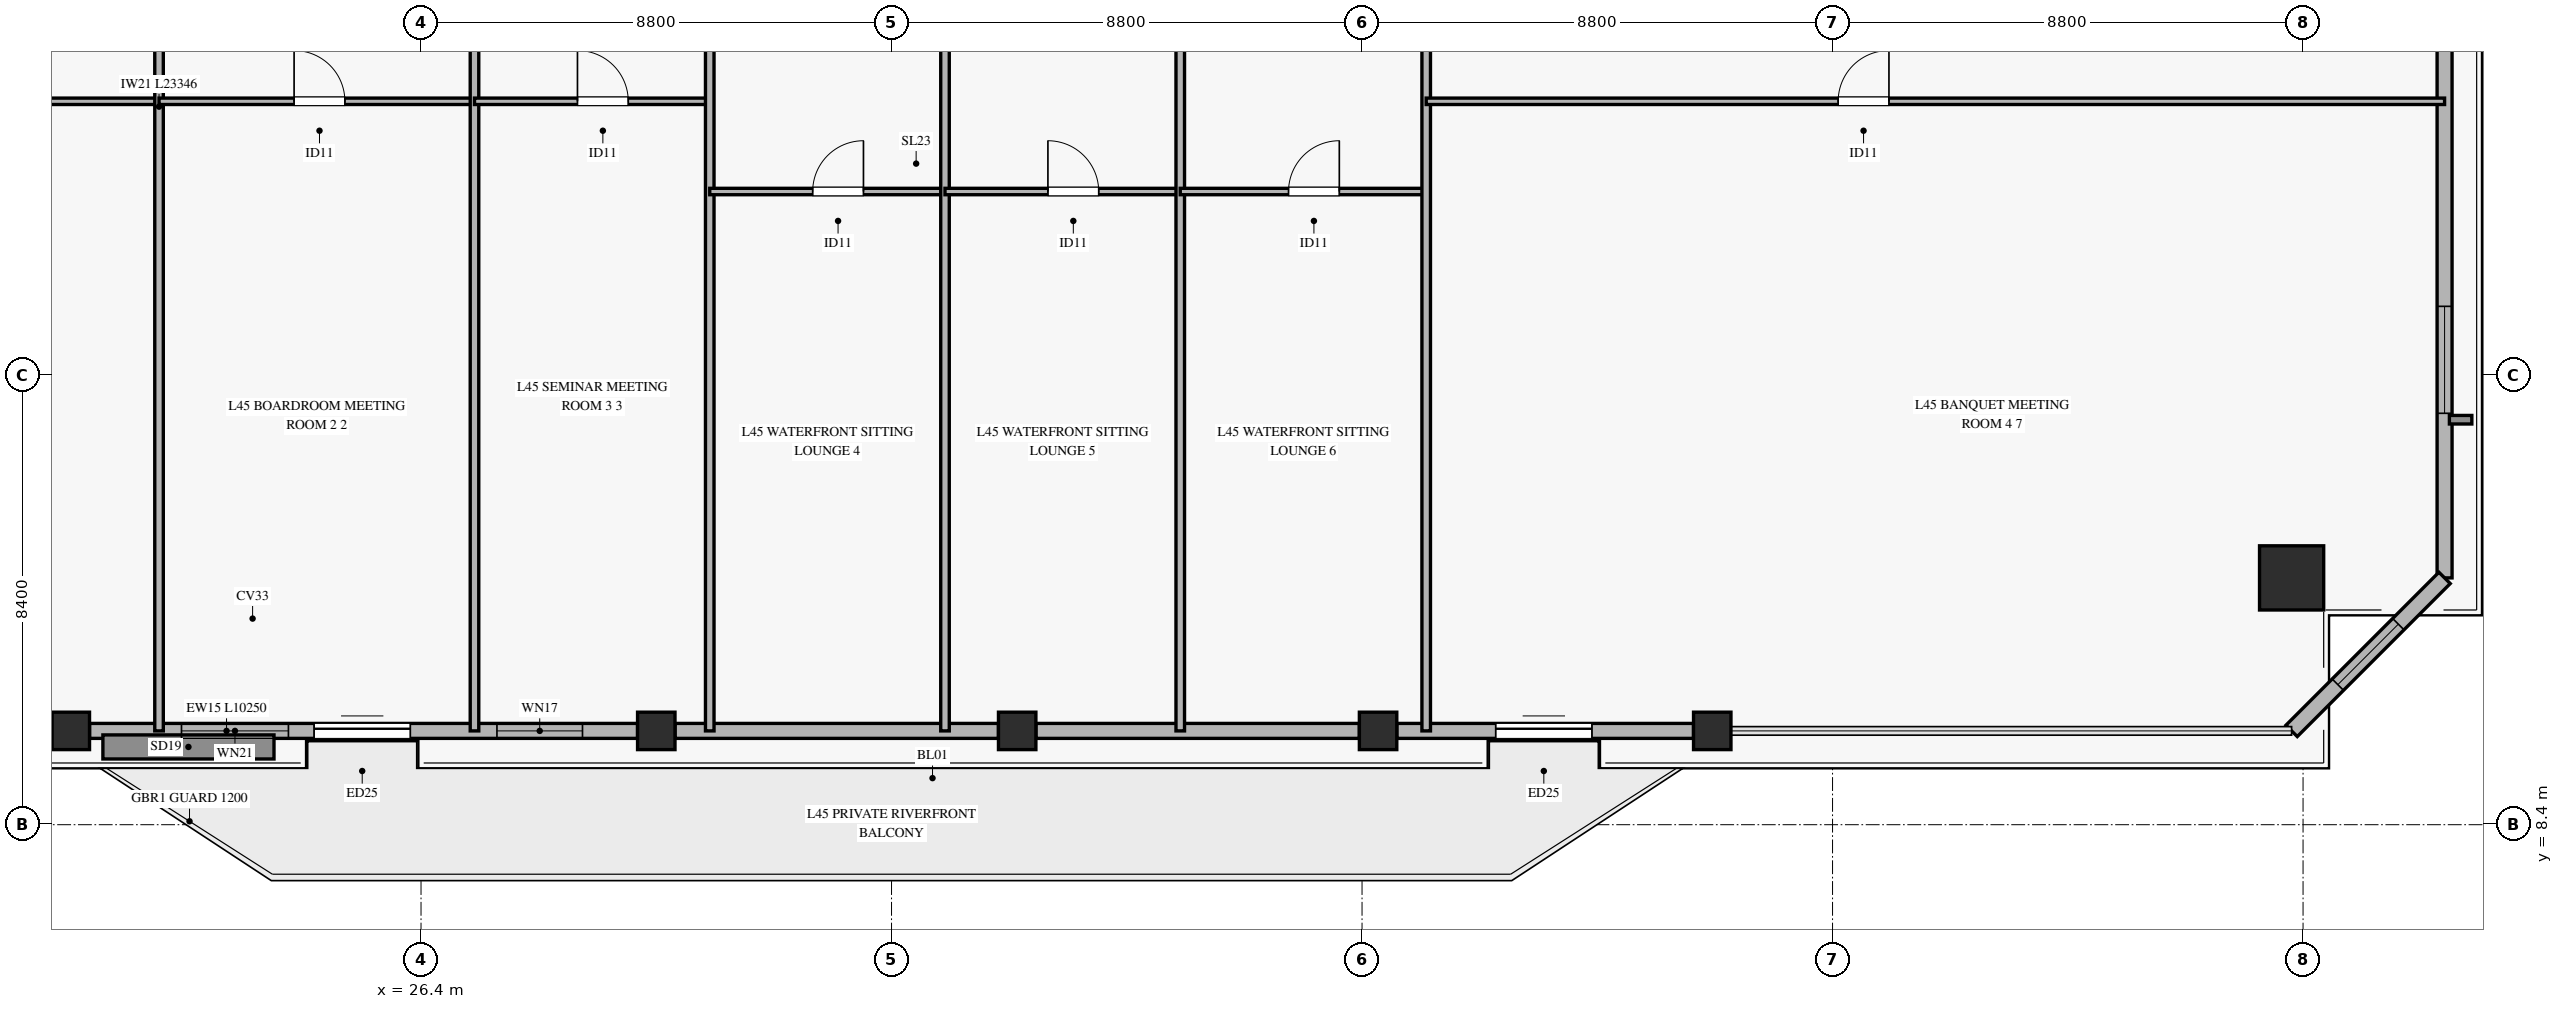
"""IFC4 building model, lengths in metres.
Left out: names, types, materials, properties, quantities, classifications, styles, units other than length and angle.
Written with IfcOpenShell. Run it as: python <this file> out.ifc"""

import sys

from ifc_helpers import new_model, si_unit, direction, frame, frame_2d, origin, origin_2d, place, context, subcontext, project, spatial, rectangle, hollow_rectangle, extrude, source, transform, mapped, element, fill, save


model = new_model("IFC4")
c1 = context("Model", 3, precision=1e-05, world=origin(), true_north=direction((0.0, 1.0)))
c2 = subcontext(c1, "Body", "Model", "MODEL_VIEW")
j1 = project(units=[si_unit("LENGTHUNIT", "METRE"), si_unit("PLANEANGLEUNIT", "RADIAN")], contexts=[c1])
p1 = place(None, origin())
s1 = spatial("IfcSite", under=j1, at=p1, CompositionType="ELEMENT")
p2 = place(p1, origin())
s2 = spatial("IfcBuilding", under=s1, at=p2, CompositionType="ELEMENT")
p3 = place(p2, frame((0.0, 0.0, 180.7)))
s3 = spatial("IfcBuildingStorey", under=s2, at=p3, CompositionType="ELEMENT", Elevation=180.7)
m1 = source(origin(), c2, "Body", "SweptSolid", [
    extrude(hollow_rectangle(XDim=1.2, YDim=1.2, WallThickness=0.055, at=origin_2d()), origin(), (0.0, 0.0, 1.0), 3.27),
])
p4 = place(p3, frame((61.386, 13.015, 0.0), z_axis=(0.0, 0.0, 1.0), x_axis=(1.0, 0.0, 0.0)))
e1 = element("IfcColumn", 1, at=p4, inside=s3, PredefinedType="COLUMN", context=c2, shape_type="MappedRepresentation", body=[
    mapped(m1, transform((0.0, 0.0, 0.0), x_axis=(1.0, 0.0, 0.0), y_axis=(0.0, 1.0, 0.0), z_axis=(0.0, 0.0, 1.0), scale=1.0)),
])
m2 = source(origin(), c2, "Body", "SweptSolid", [
    extrude(hollow_rectangle(XDim=0.7, YDim=0.7, WallThickness=0.032, at=origin_2d()), origin(), (0.0, 0.0, 1.0), 3.27),
])
for number, where, z_axis, x_axis in (
    (2, (19.85, 10.154, 0.0), (0.0, 0.0, 1.0), (1.0, 0.0, 0.0)),
    (3, (30.8, 10.154, 0.0), (0.0, 0.0, 1.0), (1.0, 0.0, 0.0)),
    (4, (37.55, 10.154, 0.0), (0.0, 0.0, 1.0), (1.0, 0.0, 0.0)),
    (5, (44.3, 10.154, 0.0), (0.0, 0.0, 1.0), (1.0, 0.0, 0.0)),
    (6, (50.55, 10.154, 0.0), (0.0, 0.0, 1.0), (1.0, 0.0, 0.0)),
):
    element("IfcColumn", number, at=place(p3, frame(where, z_axis=z_axis, x_axis=x_axis)), inside=s3, PredefinedType="COLUMN", context=c2, shape_type="MappedRepresentation", body=[
        mapped(m2, transform((0.0, 0.0, 0.0), x_axis=(1.0, 0.0, 0.0), y_axis=(0.0, 1.0, 0.0), z_axis=(0.0, 0.0, 1.0), scale=1.0)),
    ])
p5 = place(p3, frame((20.2, 10.154, 0.0), z_axis=(0.0, 0.0, 1.0), x_axis=(1.0, 0.0, 0.0)))
e7 = element("IfcWall", 7, at=p5, inside=s3, PredefinedType="SOLIDWALL", context=c2, shape_type="SweptSolid", body=[
    extrude(rectangle(XDim=10.25, YDim=0.28, at=frame_2d((5.125, 0.0))), origin(), (0.0, 0.0, 1.0), 2.75),
])
p6 = place(p5, frame((4.2, 0.0, 0.0)))
e8 = element("IfcOpeningElement", 8, at=p6, cuts=e7, PredefinedType="OPENING", context=c2, shape_type="SweptSolid", body=[
    extrude(rectangle(XDim=1.8, YDim=2.25, at=frame_2d((0.9, 1.125))), frame((0.0, 0.15, 0.0), z_axis=(0.0, -1.0, 0.0), x_axis=(1.0, 0.0, 0.0)), (0.0, 0.0, 1.0), 0.3),
])
p7 = place(p5, frame((1.72, 0.0, 0.45)))
e9 = element("IfcOpeningElement", 9, at=p7, cuts=e7, PredefinedType="OPENING", context=c2, shape_type="SweptSolid", body=[
    extrude(rectangle(XDim=2.0, YDim=2.0, at=frame_2d((1.0, 1.0))), frame((0.0, 0.15, 0.0), z_axis=(0.0, -1.0, 0.0), x_axis=(1.0, 0.0, 0.0)), (0.0, 0.0, 1.0), 0.3),
])
p8 = place(p5, frame((7.62, 0.0, 0.45)))
e10 = element("IfcOpeningElement", 10, at=p8, cuts=e7, PredefinedType="OPENING", context=c2, shape_type="SweptSolid", body=[
    extrude(rectangle(XDim=1.6, YDim=2.0, at=frame_2d((0.8, 1.0))), frame((0.0, 0.15, 0.0), z_axis=(0.0, -1.0, 0.0), x_axis=(1.0, 0.0, 0.0)), (0.0, 0.0, 1.0), 0.3),
])
for number, where, z_axis, x_axis in (
    (11, (31.15, 10.154, 0.0), (0.0, 0.0, 1.0), (1.0, 0.0, 0.0)),
    (12, (37.9, 10.154, 0.0), (0.0, 0.0, 1.0), (1.0, 0.0, 0.0)),
):
    element("IfcWall", number, at=place(p3, frame(where, z_axis=z_axis, x_axis=x_axis)), inside=s3, PredefinedType="SOLIDWALL", context=c2, shape_type="SweptSolid", body=[
        extrude(rectangle(XDim=6.05, YDim=0.28, at=frame_2d((3.025, 0.0))), origin(), (0.0, 0.0, 1.0), 2.75),
    ])
p9 = place(p3, frame((44.65, 10.154, 0.0), z_axis=(0.0, 0.0, 1.0), x_axis=(1.0, 0.0, 0.0)))
e13 = element("IfcWall", 13, at=p9, inside=s3, PredefinedType="SOLIDWALL", context=c2, shape_type="SweptSolid", body=[
    extrude(rectangle(XDim=5.55, YDim=0.28, at=frame_2d((2.775, 0.0))), origin(), (0.0, 0.0, 1.0), 2.75),
])
p10 = place(p9, frame((1.85, 0.0, 0.0)))
e14 = element("IfcOpeningElement", 14, at=p10, cuts=e13, PredefinedType="OPENING", context=c2, shape_type="SweptSolid", body=[
    extrude(rectangle(XDim=1.8, YDim=2.25, at=frame_2d((0.9, 1.125))), frame((0.0, 0.15, 0.0), z_axis=(0.0, -1.0, 0.0), x_axis=(1.0, 0.0, 0.0)), (0.0, 0.0, 1.0), 0.3),
])
p11 = place(p3, frame((64.247, 13.015, 0.0), z_axis=(0.0, 0.0, 1.0), x_axis=(0.0, 1.0, 0.0)))
e15 = element("IfcWall", 15, at=p11, inside=s3, PredefinedType="SOLIDWALL", context=c2, shape_type="SweptSolid", body=[
    extrude(rectangle(XDim=14.762, YDim=0.28, at=frame_2d((7.381, 0.0))), origin(), (0.0, 0.0, 1.0), 2.75),
])
p12 = place(p11, frame((3.078, 0.0, 0.45)))
e16 = element("IfcOpeningElement", 16, at=p12, cuts=e15, PredefinedType="OPENING", context=c2, shape_type="SweptSolid", body=[
    extrude(rectangle(XDim=2.0, YDim=2.0, at=frame_2d((1.0, 1.0))), frame((0.0, 0.15, 0.0), z_axis=(0.0, -1.0, 0.0), x_axis=(1.0, 0.0, 0.0)), (0.0, 0.0, 1.0), 0.3),
])
p13 = place(p11, frame((9.959, 0.0, 0.45)))
e17 = element("IfcOpeningElement", 17, at=p13, cuts=e15, PredefinedType="OPENING", context=c2, shape_type="SweptSolid", body=[
    extrude(rectangle(XDim=2.0, YDim=2.0, at=frame_2d((1.0, 1.0))), frame((0.0, 0.15, 0.0), z_axis=(0.0, -1.0, 0.0), x_axis=(1.0, 0.0, 0.0)), (0.0, 0.0, 1.0), 0.3),
])
p14 = place(p3, frame((61.386, 10.154, 0.0), z_axis=(0.0, 0.0, 1.0), x_axis=(0.707136951076, 0.70707661001, 0.0)))
e18 = element("IfcWall", 18, at=p14, inside=s3, PredefinedType="SOLIDWALL", context=c2, shape_type="SweptSolid", body=[
    extrude(rectangle(XDim=4.046, YDim=0.3, at=frame_2d((2.023, 0.0))), origin(), (0.0, 0.0, 1.0), 2.75),
])
p15 = place(p14, frame((1.223, 0.0, 0.45)))
e19 = element("IfcOpeningElement", 19, at=p15, cuts=e18, PredefinedType="OPENING", context=c2, shape_type="SweptSolid", body=[
    extrude(rectangle(XDim=1.6, YDim=2.0, at=frame_2d((0.8, 1.0))), frame((0.0, 0.16, 0.0), z_axis=(0.0, -1.0, 0.0), x_axis=(1.0, 0.0, 0.0)), (0.0, 0.0, 1.0), 0.32),
])
p16 = place(p3, frame((6.154, 21.927, 0.0), z_axis=(0.0, 0.0, 1.0), x_axis=(1.0, 0.0, 0.0)))
e20 = element("IfcWall", 20, at=p16, inside=s3, PredefinedType="PARTITIONING", context=c2, shape_type="SweptSolid", body=[
    extrude(rectangle(XDim=15.346, YDim=0.12, at=frame_2d((7.673, 0.0))), origin(), (0.0, 0.0, 1.0), 2.455),
])
p17 = place(p16, frame((6.424, 0.0, 0.0)))
e21 = element("IfcOpeningElement", 21, at=p17, cuts=e20, PredefinedType="OPENING", context=c2, shape_type="SweptSolid", body=[
    extrude(rectangle(XDim=0.95, YDim=2.1, at=frame_2d((0.475, 1.05))), frame((0.0, 0.07, 0.0), z_axis=(0.0, -1.0, 0.0), x_axis=(1.0, 0.0, 0.0)), (0.0, 0.0, 1.0), 0.14),
])
p18 = place(p3, frame((21.5, 10.154, 0.0), z_axis=(0.0, 0.0, 1.0), x_axis=(0.0, 1.0, 0.0)))
e22 = element("IfcWall", 22, at=p18, inside=s3, PredefinedType="PARTITIONING", context=c2, shape_type="SweptSolid", body=[
    extrude(rectangle(XDim=23.346, YDim=0.16, at=frame_2d((11.673, 0.0))), origin(), (0.0, 0.0, 1.0), 2.755),
])
p19 = place(p3, frame((21.5, 21.927, 0.0), z_axis=(0.0, 0.0, 1.0), x_axis=(1.0, 0.0, 0.0)))
e23 = element("IfcWall", 23, at=p19, inside=s3, PredefinedType="PARTITIONING", context=c2, shape_type="SweptSolid", body=[
    extrude(rectangle(XDim=5.9, YDim=0.12, at=frame_2d((2.95, 0.0))), origin(), (0.0, 0.0, 1.0), 3.27),
])
p20 = place(p19, frame((2.526, 0.0, 0.0)))
e24 = element("IfcOpeningElement", 24, at=p20, cuts=e23, PredefinedType="OPENING", context=c2, shape_type="SweptSolid", body=[
    extrude(rectangle(XDim=0.95, YDim=2.1, at=frame_2d((0.475, 1.05))), frame((0.0, 0.07, 0.0), z_axis=(0.0, -1.0, 0.0), x_axis=(1.0, 0.0, 0.0)), (0.0, 0.0, 1.0), 0.14),
])
p21 = place(p3, frame((27.4, 10.154, 0.0), z_axis=(0.0, 0.0, 1.0), x_axis=(0.0, 1.0, 0.0)))
e25 = element("IfcWall", 25, at=p21, inside=s3, PredefinedType="PARTITIONING", context=c2, shape_type="SweptSolid", body=[
    extrude(rectangle(XDim=23.346, YDim=0.16, at=frame_2d((11.673, 0.0))), origin(), (0.0, 0.0, 1.0), 2.755),
])
p22 = place(p3, frame((27.4, 21.927, 0.0), z_axis=(0.0, 0.0, 1.0), x_axis=(1.0, 0.0, 0.0)))
e26 = element("IfcWall", 26, at=p22, inside=s3, PredefinedType="PARTITIONING", context=c2, shape_type="SweptSolid", body=[
    extrude(rectangle(XDim=4.4, YDim=0.12, at=frame_2d((2.2, 0.0))), origin(), (0.0, 0.0, 1.0), 2.455),
])
p23 = place(p22, frame((1.926, 0.0, 0.0)))
e27 = element("IfcOpeningElement", 27, at=p23, cuts=e26, PredefinedType="OPENING", context=c2, shape_type="SweptSolid", body=[
    extrude(rectangle(XDim=0.95, YDim=2.1, at=frame_2d((0.475, 1.05))), frame((0.0, 0.07, 0.0), z_axis=(0.0, -1.0, 0.0), x_axis=(1.0, 0.0, 0.0)), (0.0, 0.0, 1.0), 0.14),
])
p24 = place(p3, frame((31.8, 10.154, 0.0), z_axis=(0.0, 0.0, 1.0), x_axis=(0.0, 1.0, 0.0)))
e28 = element("IfcWall", 28, at=p24, inside=s3, PredefinedType="PARTITIONING", context=c2, shape_type="SweptSolid", body=[
    extrude(rectangle(XDim=23.346, YDim=0.16, at=frame_2d((11.673, 0.0))), origin(), (0.0, 0.0, 1.0), 2.755),
])
p25 = place(p3, frame((31.8, 20.24, 0.0), z_axis=(0.0, 0.0, 1.0), x_axis=(1.0, 0.0, 0.0)))
e29 = element("IfcWall", 29, at=p25, inside=s3, PredefinedType="PARTITIONING", context=c2, shape_type="SweptSolid", body=[
    extrude(rectangle(XDim=4.4, YDim=0.12, at=frame_2d((2.2, 0.0))), origin(), (0.0, 0.0, 1.0), 3.27),
])
p26 = place(p25, frame((1.925, 0.0, 0.0)))
e30 = element("IfcOpeningElement", 30, at=p26, cuts=e29, PredefinedType="OPENING", context=c2, shape_type="SweptSolid", body=[
    extrude(rectangle(XDim=0.95, YDim=2.1, at=frame_2d((0.475, 1.05))), frame((0.0, 0.07, 0.0), z_axis=(0.0, -1.0, 0.0), x_axis=(1.0, 0.0, 0.0)), (0.0, 0.0, 1.0), 0.14),
])
p27 = place(p3, frame((36.2, 10.154, 0.0), z_axis=(0.0, 0.0, 1.0), x_axis=(0.0, 1.0, 0.0)))
e31 = element("IfcWall", 31, at=p27, inside=s3, PredefinedType="PARTITIONING", context=c2, shape_type="SweptSolid", body=[
    extrude(rectangle(XDim=23.346, YDim=0.16, at=frame_2d((11.673, 0.0))), origin(), (0.0, 0.0, 1.0), 2.755),
])
p28 = place(p3, frame((36.2, 20.24, 0.0), z_axis=(0.0, 0.0, 1.0), x_axis=(1.0, 0.0, 0.0)))
e32 = element("IfcWall", 32, at=p28, inside=s3, PredefinedType="PARTITIONING", context=c2, shape_type="SweptSolid", body=[
    extrude(rectangle(XDim=4.4, YDim=0.12, at=frame_2d((2.2, 0.0))), origin(), (0.0, 0.0, 1.0), 2.455),
])
p29 = place(p28, frame((1.925, 0.0, 0.0)))
e33 = element("IfcOpeningElement", 33, at=p29, cuts=e32, PredefinedType="OPENING", context=c2, shape_type="SweptSolid", body=[
    extrude(rectangle(XDim=0.95, YDim=2.1, at=frame_2d((0.475, 1.05))), frame((0.0, 0.07, 0.0), z_axis=(0.0, -1.0, 0.0), x_axis=(1.0, 0.0, 0.0)), (0.0, 0.0, 1.0), 0.14),
])
p30 = place(p3, frame((40.6, 10.154, 0.0), z_axis=(0.0, 0.0, 1.0), x_axis=(0.0, 1.0, 0.0)))
e34 = element("IfcWall", 34, at=p30, inside=s3, PredefinedType="PARTITIONING", context=c2, shape_type="SweptSolid", body=[
    extrude(rectangle(XDim=23.346, YDim=0.16, at=frame_2d((11.673, 0.0))), origin(), (0.0, 0.0, 1.0), 2.755),
])
p31 = place(p3, frame((40.6, 20.24, 0.0), z_axis=(0.0, 0.0, 1.0), x_axis=(1.0, 0.0, 0.0)))
e35 = element("IfcWall", 35, at=p31, inside=s3, PredefinedType="PARTITIONING", context=c2, shape_type="SweptSolid", body=[
    extrude(rectangle(XDim=4.6, YDim=0.12, at=frame_2d((2.3, 0.0))), origin(), (0.0, 0.0, 1.0), 2.455),
])
p32 = place(p31, frame((2.025, 0.0, 0.0)))
e36 = element("IfcOpeningElement", 36, at=p32, cuts=e35, PredefinedType="OPENING", context=c2, shape_type="SweptSolid", body=[
    extrude(rectangle(XDim=0.95, YDim=2.1, at=frame_2d((0.475, 1.05))), frame((0.0, 0.07, 0.0), z_axis=(0.0, -1.0, 0.0), x_axis=(1.0, 0.0, 0.0)), (0.0, 0.0, 1.0), 0.14),
])
p33 = place(p3, frame((45.2, 10.154, 0.0), z_axis=(0.0, 0.0, 1.0), x_axis=(0.0, 1.0, 0.0)))
e37 = element("IfcWall", 37, at=p33, inside=s3, PredefinedType="PARTITIONING", context=c2, shape_type="SweptSolid", body=[
    extrude(rectangle(XDim=23.346, YDim=0.16, at=frame_2d((11.673, 0.0))), origin(), (0.0, 0.0, 1.0), 2.755),
])
p34 = place(p3, frame((45.2, 21.927, 0.0), z_axis=(0.0, 0.0, 1.0), x_axis=(1.0, 0.0, 0.0)))
e38 = element("IfcWall", 38, at=p34, inside=s3, PredefinedType="PARTITIONING", context=c2, shape_type="SweptSolid", body=[
    extrude(rectangle(XDim=19.047, YDim=0.12, at=frame_2d((9.523, 0.0))), origin(), (0.0, 0.0, 1.0), 2.455),
])
p35 = place(p34, frame((7.705, 0.0, 0.0)))
e39 = element("IfcOpeningElement", 39, at=p35, cuts=e38, PredefinedType="OPENING", context=c2, shape_type="SweptSolid", body=[
    extrude(rectangle(XDim=0.95, YDim=2.1, at=frame_2d((0.475, 1.05))), frame((0.0, 0.07, 0.0), z_axis=(0.0, -1.0, 0.0), x_axis=(1.0, 0.0, 0.0)), (0.0, 0.0, 1.0), 0.14),
])
m3 = source(origin(), c2, "Body", "SweptSolid", [
    extrude(rectangle(XDim=1.8, YDim=2.25, at=frame_2d((0.9, 1.125))), frame((0.0, 0.025, 0.0), z_axis=(0.0, -1.0, 0.0), x_axis=(1.0, 0.0, 0.0)), (0.0, 0.0, 1.0), 0.05),
])
p36 = place(p6, origin())
e40 = element("IfcDoor", 40, at=p36, inside=s3, OperationType="SLIDING_TO_LEFT", PredefinedType="DOOR", context=c2, shape_type="MappedRepresentation", body=[
    mapped(m3, transform((0.0, 0.0, 0.0), x_axis=(1.0, 0.0, 0.0), y_axis=(0.0, 1.0, 0.0), z_axis=(0.0, 0.0, 1.0), scale=1.0)),
])
fill(e8, e40)
m4 = source(origin(), c2, "Body", "SweptSolid", [
    extrude(rectangle(XDim=2.0, YDim=2.0, at=frame_2d((1.0, 1.0))), frame((0.0, 0.03, 0.0), z_axis=(0.0, -1.0, 0.0), x_axis=(1.0, 0.0, 0.0)), (0.0, 0.0, 1.0), 0.06),
])
p37 = place(p7, origin())
e41 = element("IfcWindow", 41, at=p37, inside=s3, PartitioningType="SINGLE_PANEL", PredefinedType="WINDOW", context=c2, shape_type="MappedRepresentation", body=[
    mapped(m4, transform((0.0, 0.0, 0.0), x_axis=(1.0, 0.0, 0.0), y_axis=(0.0, 1.0, 0.0), z_axis=(0.0, 0.0, 1.0), scale=1.0)),
])
fill(e9, e41)
m5 = source(origin(), c2, "Body", "SweptSolid", [
    extrude(rectangle(XDim=1.6, YDim=2.0, at=frame_2d((0.8, 1.0))), frame((0.0, 0.03, 0.0), z_axis=(0.0, -1.0, 0.0), x_axis=(1.0, 0.0, 0.0)), (0.0, 0.0, 1.0), 0.06),
])
p38 = place(p8, origin())
e42 = element("IfcWindow", 42, at=p38, inside=s3, PartitioningType="SINGLE_PANEL", PredefinedType="WINDOW", context=c2, shape_type="MappedRepresentation", body=[
    mapped(m5, transform((0.0, 0.0, 0.0), x_axis=(1.0, 0.0, 0.0), y_axis=(0.0, 1.0, 0.0), z_axis=(0.0, 0.0, 1.0), scale=1.0)),
])
fill(e10, e42)
p39 = place(p10, origin())
e43 = element("IfcDoor", 43, at=p39, inside=s3, OperationType="SLIDING_TO_LEFT", PredefinedType="DOOR", context=c2, shape_type="MappedRepresentation", body=[
    mapped(m3, transform((0.0, 0.0, 0.0), x_axis=(1.0, 0.0, 0.0), y_axis=(0.0, 1.0, 0.0), z_axis=(0.0, 0.0, 1.0), scale=1.0)),
])
fill(e14, e43)
p40 = place(p12, origin())
e44 = element("IfcWindow", 44, at=p40, inside=s3, PartitioningType="SINGLE_PANEL", PredefinedType="WINDOW", context=c2, shape_type="MappedRepresentation", body=[
    mapped(m4, transform((0.0, 0.0, 0.0), x_axis=(1.0, 0.0, 0.0), y_axis=(0.0, 1.0, 0.0), z_axis=(0.0, 0.0, 1.0), scale=1.0)),
])
fill(e16, e44)
p41 = place(p15, origin())
e45 = element("IfcWindow", 45, at=p41, inside=s3, PartitioningType="SINGLE_PANEL", PredefinedType="WINDOW", context=c2, shape_type="MappedRepresentation", body=[
    mapped(m5, transform((0.0, 0.0, 0.0), x_axis=(1.0, 0.0, 0.0), y_axis=(0.0, 1.0, 0.0), z_axis=(0.0, 0.0, 1.0), scale=1.0)),
])
fill(e19, e45)
m6 = source(origin(), c2, "Body", "SweptSolid", [
    extrude(rectangle(XDim=0.95, YDim=2.1, at=frame_2d((0.475, 1.05))), frame((0.0, 0.025, 0.0), z_axis=(0.0, -1.0, 0.0), x_axis=(1.0, 0.0, 0.0)), (0.0, 0.0, 1.0), 0.05),
])
p42 = place(p20, origin())
e46 = element("IfcDoor", 46, at=p42, inside=s3, OperationType="SINGLE_SWING_LEFT", PredefinedType="DOOR", context=c2, shape_type="MappedRepresentation", body=[
    mapped(m6, transform((0.0, 0.0, 0.0), x_axis=(1.0, 0.0, 0.0), y_axis=(0.0, 1.0, 0.0), z_axis=(0.0, 0.0, 1.0), scale=1.0)),
])
fill(e24, e46)
p43 = place(p23, origin())
e47 = element("IfcDoor", 47, at=p43, inside=s3, OperationType="SINGLE_SWING_LEFT", PredefinedType="DOOR", context=c2, shape_type="MappedRepresentation", body=[
    mapped(m6, transform((0.0, 0.0, 0.0), x_axis=(1.0, 0.0, 0.0), y_axis=(0.0, 1.0, 0.0), z_axis=(0.0, 0.0, 1.0), scale=1.0)),
])
fill(e27, e47)
p44 = place(p26, origin())
e48 = element("IfcDoor", 48, at=p44, inside=s3, OperationType="SINGLE_SWING_RIGHT", PredefinedType="DOOR", context=c2, shape_type="MappedRepresentation", body=[
    mapped(m6, transform((0.0, 0.0, 0.0), x_axis=(1.0, 0.0, 0.0), y_axis=(0.0, 1.0, 0.0), z_axis=(0.0, 0.0, 1.0), scale=1.0)),
])
fill(e30, e48)
p45 = place(p29, origin())
e49 = element("IfcDoor", 49, at=p45, inside=s3, OperationType="SINGLE_SWING_LEFT", PredefinedType="DOOR", context=c2, shape_type="MappedRepresentation", body=[
    mapped(m6, transform((0.0, 0.0, 0.0), x_axis=(1.0, 0.0, 0.0), y_axis=(0.0, 1.0, 0.0), z_axis=(0.0, 0.0, 1.0), scale=1.0)),
])
fill(e33, e49)
p46 = place(p32, origin())
e50 = element("IfcDoor", 50, at=p46, inside=s3, OperationType="SINGLE_SWING_RIGHT", PredefinedType="DOOR", context=c2, shape_type="MappedRepresentation", body=[
    mapped(m6, transform((0.0, 0.0, 0.0), x_axis=(1.0, 0.0, 0.0), y_axis=(0.0, 1.0, 0.0), z_axis=(0.0, 0.0, 1.0), scale=1.0)),
])
fill(e36, e50)
p47 = place(p35, origin())
e51 = element("IfcDoor", 51, at=p47, inside=s3, OperationType="SINGLE_SWING_RIGHT", PredefinedType="DOOR", context=c2, shape_type="MappedRepresentation", body=[
    mapped(m6, transform((0.0, 0.0, 0.0), x_axis=(1.0, 0.0, 0.0), y_axis=(0.0, 1.0, 0.0), z_axis=(0.0, 0.0, 1.0), scale=1.0)),
])
fill(e39, e51)
save(model, sys.argv[1])
